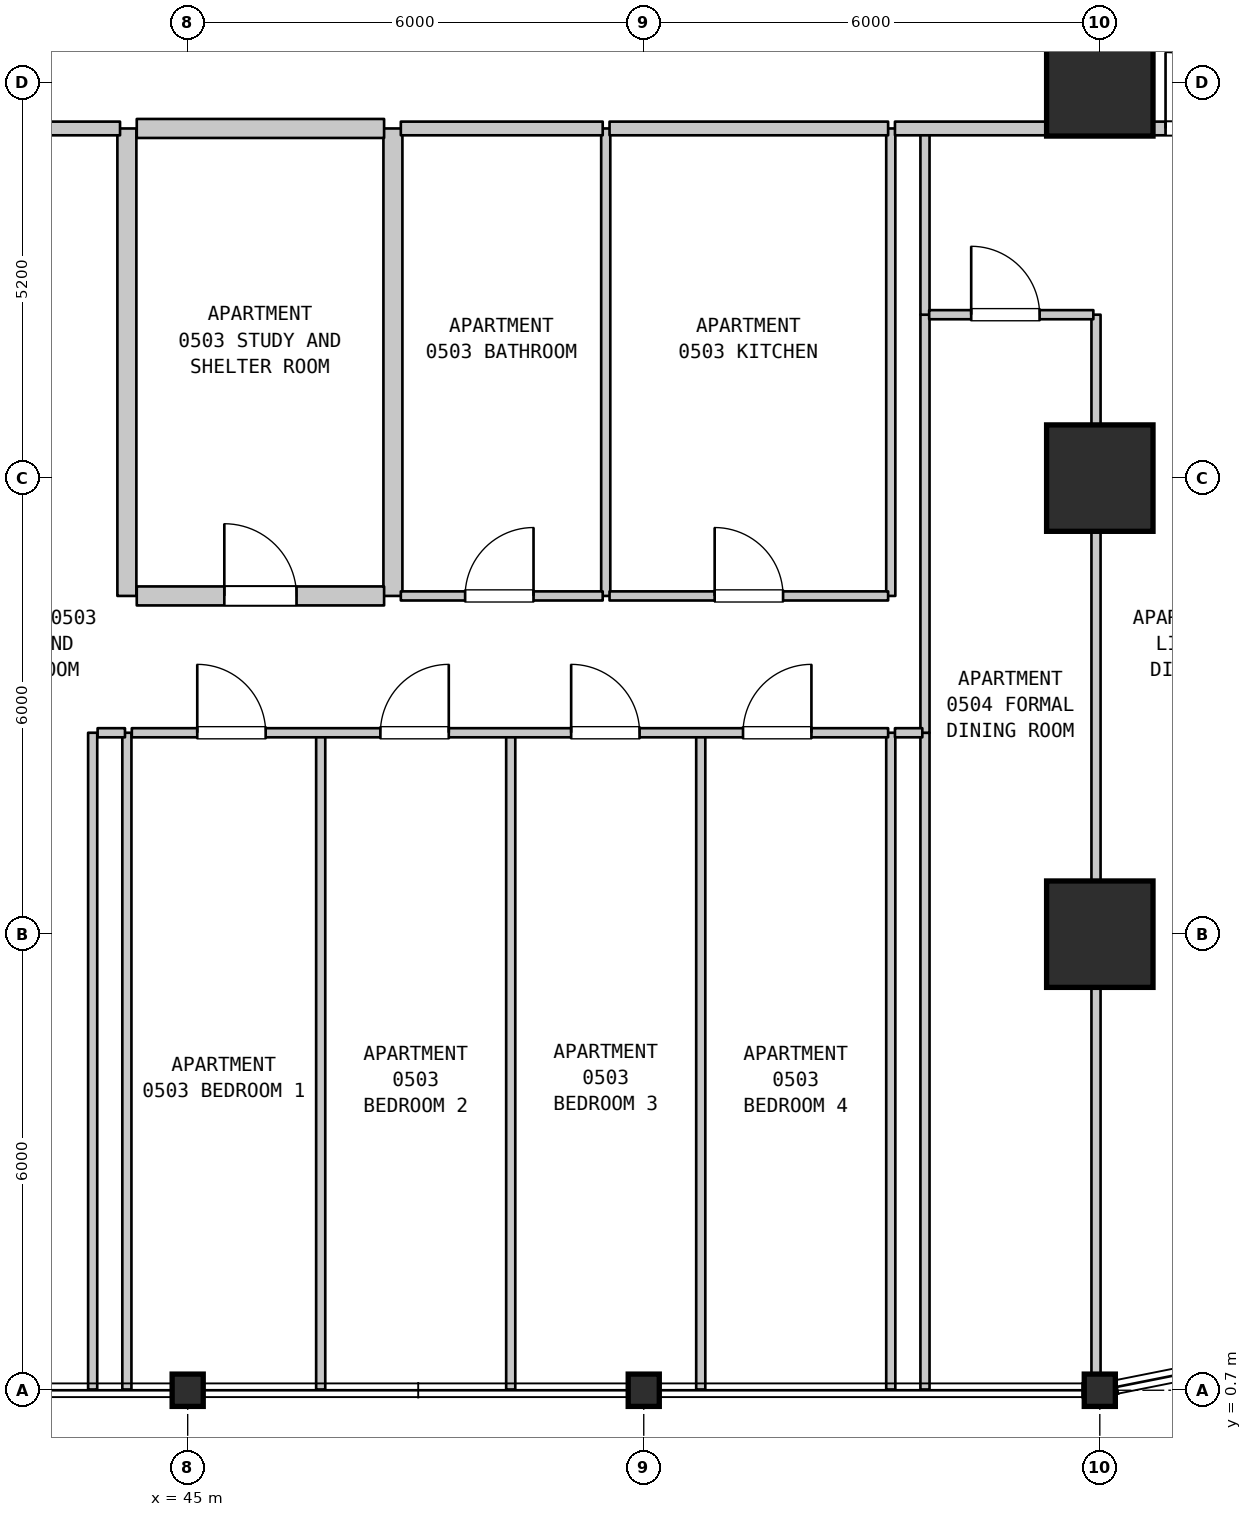
"""IFC4 building model, lengths in metres.
Left out: names, types, materials, properties, quantities, classifications, styles, units other than length and angle.
Written with IfcOpenShell. Run it as: python <this file> out.ifc"""

import sys

from ifc_helpers import new_model, si_unit, direction, frame, frame_2d, origin, origin_2d, place, context, subcontext, project, spatial, rectangle, i_section, extrude, element, fill, save


model = new_model("IFC4")
c1 = context("Model", 3, precision=1e-05, world=origin(), true_north=direction((0.0, 1.0)))
c2 = subcontext(c1, "Body", "Model", "MODEL_VIEW")
j1 = project(units=[si_unit("LENGTHUNIT", "METRE"), si_unit("PLANEANGLEUNIT", "RADIAN")], contexts=[c1])
p1 = place(None, origin())
s1 = spatial("IfcSite", under=j1, at=p1, CompositionType="ELEMENT")
p2 = place(p1, origin())
s2 = spatial("IfcBuilding", under=s1, at=p2, CompositionType="ELEMENT")
p3 = place(p2, frame((0.0, 0.0, 27.7)))
s3 = spatial("IfcBuildingStorey", under=s2, at=p3, CompositionType="ELEMENT", Elevation=27.7)
for number, where, z_axis, x_axis in (
    (1, (45.0, 0.7, 0.0), (0.0, 0.0, 1.0), (1.0, 0.0, 0.0)),
    (2, (51.0, 0.7, 0.0), (0.0, 0.0, 1.0), (1.0, 0.0, 0.0)),
    (3, (57.0, 0.7, 0.0), (0.0, 0.0, 1.0), (1.0, 0.0, 0.0)),
):
    element("IfcColumn", number, at=place(p3, frame(where, z_axis=z_axis, x_axis=x_axis)), inside=s3, PredefinedType="COLUMN", context=c2, shape_type="SweptSolid", body=[
        extrude(i_section(OverallWidth=0.409, OverallDepth=0.425, WebThickness=0.032, FlangeThickness=0.052, FilletRadius=0.015, at=origin_2d()), origin(), (0.0, 0.0, 1.0), 3.7),
    ])
for number, where, z_axis, x_axis in (
    (4, (57.0, 6.7, 0.0), (0.0, 0.0, 1.0), (1.0, 0.0, 0.0)),
    (5, (57.0, 12.7, 0.0), (0.0, 0.0, 1.0), (1.0, 0.0, 0.0)),
    (6, (57.0, 17.9, 0.0), (0.0, 0.0, 1.0), (1.0, 0.0, 0.0)),
):
    element("IfcColumn", number, at=place(p3, frame(where, z_axis=z_axis, x_axis=x_axis)), inside=s3, PredefinedType="COLUMN", context=c2, shape_type="SweptSolid", body=[
        extrude(rectangle(XDim=1.4, YDim=1.4, at=origin_2d()), origin(), (0.0, 0.0, 1.0), 3.7),
    ])
for number, where, z_axis, x_axis in (
    (7, (43.75, 0.71, 0.0), (0.0, 0.0, 1.0), (0.0, 1.0, 0.0)),
    (8, (44.2, 0.71, 0.0), (0.0, 0.0, 1.0), (0.0, 1.0, 0.0)),
):
    element("IfcWall", number, at=place(p3, frame(where, z_axis=z_axis, x_axis=x_axis)), inside=s3, PredefinedType="PARTITIONING", context=c2, shape_type="SweptSolid", body=[
        extrude(rectangle(XDim=8.64, YDim=0.12, at=frame_2d((4.32, 0.0))), origin(), (0.0, 0.0, 1.0), 3.385),
    ])
p4 = place(p3, frame((44.2, 11.15, 0.0), z_axis=(0.0, 0.0, 1.0), x_axis=(0.0, 1.0, 0.0)))
e9 = element("IfcWall", 9, at=p4, inside=s3, PredefinedType="STANDARD", context=c2, shape_type="SweptSolid", body=[
    extrude(rectangle(XDim=6.15, YDim=0.25, at=frame_2d((3.075, 0.0))), origin(), (0.0, 0.0, 1.0), 3.385),
])
p5 = place(p3, frame((46.75, 0.71, 0.0), z_axis=(0.0, 0.0, 1.0), x_axis=(0.0, 1.0, 0.0)))
e10 = element("IfcWall", 10, at=p5, inside=s3, PredefinedType="PARTITIONING", context=c2, shape_type="SweptSolid", body=[
    extrude(rectangle(XDim=8.64, YDim=0.12, at=frame_2d((4.32, 0.0))), origin(), (0.0, 0.0, 1.0), 3.385),
])
p6 = place(p3, frame((47.7, 11.15, 0.0), z_axis=(0.0, 0.0, 1.0), x_axis=(0.0, 1.0, 0.0)))
e11 = element("IfcWall", 11, at=p6, inside=s3, PredefinedType="STANDARD", context=c2, shape_type="SweptSolid", body=[
    extrude(rectangle(XDim=6.15, YDim=0.25, at=frame_2d((3.075, 0.0))), origin(), (0.0, 0.0, 1.0), 3.385),
])
p7 = place(p3, frame((49.25, 0.71, 0.0), z_axis=(0.0, 0.0, 1.0), x_axis=(0.0, 1.0, 0.0)))
e12 = element("IfcWall", 12, at=p7, inside=s3, PredefinedType="PARTITIONING", context=c2, shape_type="SweptSolid", body=[
    extrude(rectangle(XDim=8.64, YDim=0.12, at=frame_2d((4.32, 0.0))), origin(), (0.0, 0.0, 1.0), 3.385),
])
p8 = place(p3, frame((50.5, 11.15, 0.0), z_axis=(0.0, 0.0, 1.0), x_axis=(0.0, 1.0, 0.0)))
e13 = element("IfcWall", 13, at=p8, inside=s3, PredefinedType="PARTITIONING", context=c2, shape_type="SweptSolid", body=[
    extrude(rectangle(XDim=6.15, YDim=0.12, at=frame_2d((3.075, 0.0))), origin(), (0.0, 0.0, 1.0), 3.385),
])
for number, where, z_axis, x_axis in (
    (14, (51.75, 0.71, 0.0), (0.0, 0.0, 1.0), (0.0, 1.0, 0.0)),
    (15, (54.25, 0.71, 0.0), (0.0, 0.0, 1.0), (0.0, 1.0, 0.0)),
):
    element("IfcWall", number, at=place(p3, frame(where, z_axis=z_axis, x_axis=x_axis)), inside=s3, PredefinedType="PARTITIONING", context=c2, shape_type="SweptSolid", body=[
        extrude(rectangle(XDim=8.64, YDim=0.12, at=frame_2d((4.32, 0.0))), origin(), (0.0, 0.0, 1.0), 3.385),
    ])
p9 = place(p3, frame((54.25, 11.15, 0.0), z_axis=(0.0, 0.0, 1.0), x_axis=(0.0, 1.0, 0.0)))
e16 = element("IfcWall", 16, at=p9, inside=s3, PredefinedType="PARTITIONING", context=c2, shape_type="SweptSolid", body=[
    extrude(rectangle(XDim=6.15, YDim=0.12, at=frame_2d((3.075, 0.0))), origin(), (0.0, 0.0, 1.0), 3.385),
])
p10 = place(p3, frame((54.7, 0.71, 0.0), z_axis=(0.0, 0.0, 1.0), x_axis=(0.0, 1.0, 0.0)))
e17 = element("IfcWall", 17, at=p10, inside=s3, PredefinedType="PARTITIONING", context=c2, shape_type="SweptSolid", body=[
    extrude(rectangle(XDim=8.64, YDim=0.12, at=frame_2d((4.32, 0.0))), origin(), (0.0, 0.0, 1.0), 3.385),
])
p11 = place(p3, frame((54.7, 9.35, 0.0), z_axis=(0.0, 0.0, 1.0), x_axis=(0.0, 1.0, 0.0)))
e18 = element("IfcWall", 18, at=p11, inside=s3, PredefinedType="PARTITIONING", context=c2, shape_type="SweptSolid", body=[
    extrude(rectangle(XDim=5.5, YDim=0.12, at=frame_2d((2.75, 0.0))), origin(), (0.0, 0.0, 1.0), 3.385),
])
p12 = place(p3, frame((54.7, 14.85, 0.0), z_axis=(0.0, 0.0, 1.0), x_axis=(0.0, 1.0, 0.0)))
e19 = element("IfcWall", 19, at=p12, inside=s3, PredefinedType="PARTITIONING", context=c2, shape_type="SweptSolid", body=[
    extrude(rectangle(XDim=2.45, YDim=0.12, at=frame_2d((1.225, 0.0))), origin(), (0.0, 0.0, 1.0), 3.385),
])
p13 = place(p3, frame((56.95, 0.724, 0.0), z_axis=(0.0, 0.0, 1.0), x_axis=(0.0, 1.0, 0.0)))
e20 = element("IfcWall", 20, at=p13, inside=s3, PredefinedType="PARTITIONING", context=c2, shape_type="SweptSolid", body=[
    extrude(rectangle(XDim=14.126, YDim=0.12, at=frame_2d((7.063, 0.0))), origin(), (0.0, 0.0, 1.0), 2.885),
])
p14 = place(p3, frame((43.815, 9.35, 0.0), z_axis=(0.0, 0.0, 1.0), x_axis=(1.0, 0.0, 0.0)))
e21 = element("IfcWall", 21, at=p14, inside=s3, PredefinedType="PARTITIONING", context=c2, shape_type="SweptSolid", body=[
    extrude(rectangle(XDim=0.36, YDim=0.12, at=frame_2d((0.18, 0.0))), origin(), (0.0, 0.0, 1.0), 3.385),
])
p15 = place(p3, frame((44.265, 9.35, 0.0), z_axis=(0.0, 0.0, 1.0), x_axis=(1.0, 0.0, 0.0)))
e22 = element("IfcWall", 22, at=p15, inside=s3, PredefinedType="PARTITIONING", context=c2, shape_type="SweptSolid", body=[
    extrude(rectangle(XDim=9.95, YDim=0.12, at=frame_2d((4.975, 0.0))), origin(), (0.0, 0.0, 1.0), 3.385),
])
p16 = place(p15, frame((0.861, 0.0, 0.0)))
e23 = element("IfcOpeningElement", 23, at=p16, cuts=e22, PredefinedType="OPENING", context=c2, shape_type="SweptSolid", body=[
    extrude(rectangle(XDim=0.9, YDim=2.15, at=frame_2d((0.45, 1.075))), frame((0.0, 0.07, 0.0), z_axis=(0.0, -1.0, 0.0), x_axis=(1.0, 0.0, 0.0)), (0.0, 0.0, 1.0), 0.14),
])
p17 = place(p15, frame((3.27, 0.0, 0.0)))
e24 = element("IfcOpeningElement", 24, at=p17, cuts=e22, PredefinedType="OPENING", context=c2, shape_type="SweptSolid", body=[
    extrude(rectangle(XDim=0.9, YDim=2.15, at=frame_2d((0.45, 1.075))), frame((0.0, 0.07, 0.0), z_axis=(0.0, -1.0, 0.0), x_axis=(1.0, 0.0, 0.0)), (0.0, 0.0, 1.0), 0.14),
])
p18 = place(p15, frame((5.78, 0.0, 0.0)))
e25 = element("IfcOpeningElement", 25, at=p18, cuts=e22, PredefinedType="OPENING", context=c2, shape_type="SweptSolid", body=[
    extrude(rectangle(XDim=0.9, YDim=2.15, at=frame_2d((0.45, 1.075))), frame((0.0, 0.07, 0.0), z_axis=(0.0, -1.0, 0.0), x_axis=(1.0, 0.0, 0.0)), (0.0, 0.0, 1.0), 0.14),
])
p19 = place(p15, frame((8.041, 0.0, 0.0)))
e26 = element("IfcOpeningElement", 26, at=p19, cuts=e22, PredefinedType="OPENING", context=c2, shape_type="SweptSolid", body=[
    extrude(rectangle(XDim=0.9, YDim=2.15, at=frame_2d((0.45, 1.075))), frame((0.0, 0.07, 0.0), z_axis=(0.0, -1.0, 0.0), x_axis=(1.0, 0.0, 0.0)), (0.0, 0.0, 1.0), 0.14),
])
p20 = place(p3, frame((54.305, 9.35, 0.0), z_axis=(0.0, 0.0, 1.0), x_axis=(1.0, 0.0, 0.0)))
e27 = element("IfcWall", 27, at=p20, inside=s3, PredefinedType="PARTITIONING", context=c2, shape_type="SweptSolid", body=[
    extrude(rectangle(XDim=0.36, YDim=0.12, at=frame_2d((0.18, 0.0))), origin(), (0.0, 0.0, 1.0), 3.385),
])
p21 = place(p3, frame((44.33, 11.15, 0.0), z_axis=(0.0, 0.0, 1.0), x_axis=(1.0, 0.0, 0.0)))
e28 = element("IfcWall", 28, at=p21, inside=s3, PredefinedType="STANDARD", context=c2, shape_type="SweptSolid", body=[
    extrude(rectangle(XDim=3.254, YDim=0.25, at=frame_2d((1.627, 0.0))), origin(), (0.0, 0.0, 1.0), 3.385),
])
p22 = place(p21, frame((1.152, 0.0, 0.0)))
e29 = element("IfcOpeningElement", 29, at=p22, cuts=e28, PredefinedType="OPENING", context=c2, shape_type="SweptSolid", body=[
    extrude(rectangle(XDim=0.95, YDim=2.15, at=frame_2d((0.475, 1.075))), frame((0.0, 0.135, 0.0), z_axis=(0.0, -1.0, 0.0), x_axis=(1.0, 0.0, 0.0)), (0.0, 0.0, 1.0), 0.27),
])
p23 = place(p3, frame((47.804, 11.15, 0.0), z_axis=(0.0, 0.0, 1.0), x_axis=(1.0, 0.0, 0.0)))
e30 = element("IfcWall", 30, at=p23, inside=s3, PredefinedType="PARTITIONING", context=c2, shape_type="SweptSolid", body=[
    extrude(rectangle(XDim=2.656, YDim=0.12, at=frame_2d((1.328, 0.0))), origin(), (0.0, 0.0, 1.0), 3.385),
])
p24 = place(p23, frame((0.846, 0.0, 0.0)))
e31 = element("IfcOpeningElement", 31, at=p24, cuts=e30, PredefinedType="OPENING", context=c2, shape_type="SweptSolid", body=[
    extrude(rectangle(XDim=0.9, YDim=2.1, at=frame_2d((0.45, 1.05))), frame((0.0, 0.07, 0.0), z_axis=(0.0, -1.0, 0.0), x_axis=(1.0, 0.0, 0.0)), (0.0, 0.0, 1.0), 0.14),
])
p25 = place(p3, frame((50.55, 11.15, 0.0), z_axis=(0.0, 0.0, 1.0), x_axis=(1.0, 0.0, 0.0)))
e32 = element("IfcWall", 32, at=p25, inside=s3, PredefinedType="PARTITIONING", context=c2, shape_type="SweptSolid", body=[
    extrude(rectangle(XDim=3.665, YDim=0.12, at=frame_2d((1.833, 0.0))), origin(), (0.0, 0.0, 1.0), 3.385),
])
p26 = place(p25, frame((1.383, 0.0, 0.0)))
e33 = element("IfcOpeningElement", 33, at=p26, cuts=e32, PredefinedType="OPENING", context=c2, shape_type="SweptSolid", body=[
    extrude(rectangle(XDim=0.9, YDim=2.15, at=frame_2d((0.45, 1.075))), frame((0.0, 0.07, 0.0), z_axis=(0.0, -1.0, 0.0), x_axis=(1.0, 0.0, 0.0)), (0.0, 0.0, 1.0), 0.14),
])
p27 = place(p3, frame((54.755, 14.85, 0.0), z_axis=(0.0, 0.0, 1.0), x_axis=(1.0, 0.0, 0.0)))
e34 = element("IfcWall", 34, at=p27, inside=s3, PredefinedType="PARTITIONING", context=c2, shape_type="SweptSolid", body=[
    extrude(rectangle(XDim=2.16, YDim=0.12, at=frame_2d((1.08, 0.0))), origin(), (0.0, 0.0, 1.0), 3.385),
])
p28 = place(p27, frame((0.553, 0.0, 0.0)))
e35 = element("IfcOpeningElement", 35, at=p28, cuts=e34, PredefinedType="OPENING", context=c2, shape_type="SweptSolid", body=[
    extrude(rectangle(XDim=0.9, YDim=2.15, at=frame_2d((0.45, 1.075))), frame((0.0, 0.07, 0.0), z_axis=(0.0, -1.0, 0.0), x_axis=(1.0, 0.0, 0.0)), (0.0, 0.0, 1.0), 0.14),
])
p29 = place(p3, frame((38.565, 17.3, 0.0), z_axis=(0.0, 0.0, 1.0), x_axis=(1.0, 0.0, 0.0)))
e36 = element("IfcWall", 36, at=p29, inside=s3, PredefinedType="STANDARD", context=c2, shape_type="SweptSolid", body=[
    extrude(rectangle(XDim=5.545, YDim=0.18, at=frame_2d((2.772, 0.0))), origin(), (0.0, 0.0, 1.0), 3.385),
])
p30 = place(p29, frame((2.435, 0.0, 0.0)))
e37 = element("IfcOpeningElement", 37, at=p30, cuts=e36, PredefinedType="OPENING", context=c2, shape_type="SweptSolid", body=[
    extrude(rectangle(XDim=1.0, YDim=2.15, at=frame_2d((0.5, 1.075))), frame((0.0, 0.1, 0.0), z_axis=(0.0, -1.0, 0.0), x_axis=(1.0, 0.0, 0.0)), (0.0, 0.0, 1.0), 0.2),
])
p31 = place(p3, frame((44.33, 17.3, 0.0), z_axis=(0.0, 0.0, 1.0), x_axis=(1.0, 0.0, 0.0)))
e38 = element("IfcWall", 38, at=p31, inside=s3, PredefinedType="STANDARD", context=c2, shape_type="SweptSolid", body=[
    extrude(rectangle(XDim=3.254, YDim=0.25, at=frame_2d((1.627, 0.0))), origin(), (0.0, 0.0, 1.0), 3.385),
])
p32 = place(p3, frame((47.804, 17.3, 0.0), z_axis=(0.0, 0.0, 1.0), x_axis=(1.0, 0.0, 0.0)))
e39 = element("IfcWall", 39, at=p32, inside=s3, PredefinedType="STANDARD", context=c2, shape_type="SweptSolid", body=[
    extrude(rectangle(XDim=2.656, YDim=0.18, at=frame_2d((1.328, 0.0))), origin(), (0.0, 0.0, 1.0), 3.385),
])
p33 = place(p3, frame((50.55, 17.3, 0.0), z_axis=(0.0, 0.0, 1.0), x_axis=(1.0, 0.0, 0.0)))
e40 = element("IfcWall", 40, at=p33, inside=s3, PredefinedType="STANDARD", context=c2, shape_type="SweptSolid", body=[
    extrude(rectangle(XDim=3.665, YDim=0.18, at=frame_2d((1.833, 0.0))), origin(), (0.0, 0.0, 1.0), 3.385),
])
p34 = place(p3, frame((54.305, 17.3, 0.0), z_axis=(0.0, 0.0, 1.0), x_axis=(1.0, 0.0, 0.0)))
e41 = element("IfcWall", 41, at=p34, inside=s3, PredefinedType="STANDARD", context=c2, shape_type="SweptSolid", body=[
    extrude(rectangle(XDim=5.545, YDim=0.18, at=frame_2d((2.772, 0.0))), origin(), (0.0, 0.0, 1.0), 3.385),
])
p35 = place(p34, frame((3.56, 0.0, 0.0)))
e42 = element("IfcOpeningElement", 42, at=p35, cuts=e41, PredefinedType="OPENING", context=c2, shape_type="SweptSolid", body=[
    extrude(rectangle(XDim=1.0, YDim=2.15, at=frame_2d((0.5, 1.075))), frame((0.0, 0.1, 0.0), z_axis=(0.0, -1.0, 0.0), x_axis=(1.0, 0.0, 0.0)), (0.0, 0.0, 1.0), 0.2),
])
p36 = place(p16, origin())
e43 = element("IfcDoor", 43, at=p36, inside=s3, OperationType="SINGLE_SWING_LEFT", PredefinedType="DOOR", context=c2, shape_type="SweptSolid", body=[
    extrude(rectangle(XDim=0.9, YDim=2.15, at=frame_2d((0.45, 1.075))), frame((0.0, 0.025, 0.0), z_axis=(0.0, -1.0, 0.0), x_axis=(1.0, 0.0, 0.0)), (0.0, 0.0, 1.0), 0.05),
])
fill(e23, e43)
p37 = place(p17, origin())
e44 = element("IfcDoor", 44, at=p37, inside=s3, OperationType="SINGLE_SWING_RIGHT", PredefinedType="DOOR", context=c2, shape_type="SweptSolid", body=[
    extrude(rectangle(XDim=0.9, YDim=2.15, at=frame_2d((0.45, 1.075))), frame((0.0, 0.025, 0.0), z_axis=(0.0, -1.0, 0.0), x_axis=(1.0, 0.0, 0.0)), (0.0, 0.0, 1.0), 0.05),
])
fill(e24, e44)
p38 = place(p18, origin())
e45 = element("IfcDoor", 45, at=p38, inside=s3, OperationType="SINGLE_SWING_LEFT", PredefinedType="DOOR", context=c2, shape_type="SweptSolid", body=[
    extrude(rectangle(XDim=0.9, YDim=2.15, at=frame_2d((0.45, 1.075))), frame((0.0, 0.025, 0.0), z_axis=(0.0, -1.0, 0.0), x_axis=(1.0, 0.0, 0.0)), (0.0, 0.0, 1.0), 0.05),
])
fill(e25, e45)
p39 = place(p19, origin())
e46 = element("IfcDoor", 46, at=p39, inside=s3, OperationType="SINGLE_SWING_RIGHT", PredefinedType="DOOR", context=c2, shape_type="SweptSolid", body=[
    extrude(rectangle(XDim=0.9, YDim=2.15, at=frame_2d((0.45, 1.075))), frame((0.0, 0.025, 0.0), z_axis=(0.0, -1.0, 0.0), x_axis=(1.0, 0.0, 0.0)), (0.0, 0.0, 1.0), 0.05),
])
fill(e26, e46)
p40 = place(p22, origin())
e47 = element("IfcDoor", 47, at=p40, inside=s3, OperationType="SINGLE_SWING_LEFT", PredefinedType="DOOR", context=c2, shape_type="SweptSolid", body=[
    extrude(rectangle(XDim=0.95, YDim=2.15, at=frame_2d((0.475, 1.075))), frame((0.0, 0.025, 0.0), z_axis=(0.0, -1.0, 0.0), x_axis=(1.0, 0.0, 0.0)), (0.0, 0.0, 1.0), 0.05),
])
fill(e29, e47)
p41 = place(p24, origin())
e48 = element("IfcDoor", 48, at=p41, inside=s3, OperationType="SINGLE_SWING_RIGHT", PredefinedType="DOOR", context=c2, shape_type="SweptSolid", body=[
    extrude(rectangle(XDim=0.9, YDim=2.1, at=frame_2d((0.45, 1.05))), frame((0.0, 0.025, 0.0), z_axis=(0.0, -1.0, 0.0), x_axis=(1.0, 0.0, 0.0)), (0.0, 0.0, 1.0), 0.05),
])
fill(e31, e48)
p42 = place(p26, origin())
e49 = element("IfcDoor", 49, at=p42, inside=s3, OperationType="SINGLE_SWING_LEFT", PredefinedType="DOOR", context=c2, shape_type="SweptSolid", body=[
    extrude(rectangle(XDim=0.9, YDim=2.15, at=frame_2d((0.45, 1.075))), frame((0.0, 0.025, 0.0), z_axis=(0.0, -1.0, 0.0), x_axis=(1.0, 0.0, 0.0)), (0.0, 0.0, 1.0), 0.05),
])
fill(e33, e49)
p43 = place(p28, origin())
e50 = element("IfcDoor", 50, at=p43, inside=s3, OperationType="SINGLE_SWING_LEFT", PredefinedType="DOOR", context=c2, shape_type="SweptSolid", body=[
    extrude(rectangle(XDim=0.9, YDim=2.15, at=frame_2d((0.45, 1.075))), frame((0.0, 0.025, 0.0), z_axis=(0.0, -1.0, 0.0), x_axis=(1.0, 0.0, 0.0)), (0.0, 0.0, 1.0), 0.05),
])
fill(e35, e50)
p44 = place(p35, origin())
e51 = element("IfcDoor", 51, at=p44, inside=s3, OperationType="SINGLE_SWING_LEFT", PredefinedType="DOOR", context=c2, shape_type="SweptSolid", body=[
    extrude(rectangle(XDim=1.0, YDim=2.15, at=frame_2d((0.5, 1.075))), frame((0.0, 0.025, 0.0), z_axis=(0.0, -1.0, 0.0), x_axis=(1.0, 0.0, 0.0)), (0.0, 0.0, 1.0), 0.05),
])
fill(e42, e51)
save(model, sys.argv[1])
